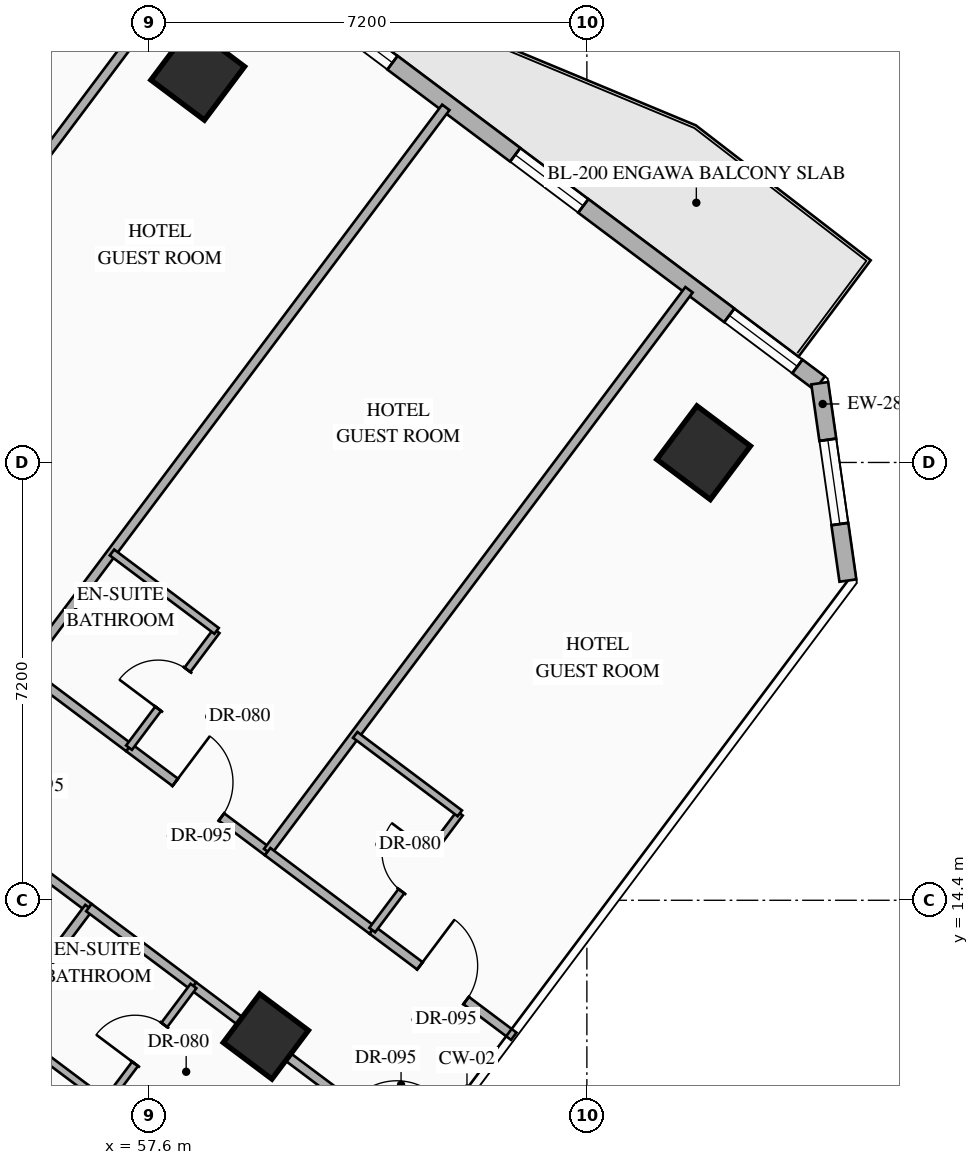
"""IFC4 building model, lengths in metres.
Left out: names, types, materials, properties, quantities, classifications, styles, units other than length and angle.
Written with IfcOpenShell. Run it as: python <this file> out.ifc"""

import sys

from ifc_helpers import new_model, si_unit, direction, frame, frame_2d, origin, origin_2d, place, context, subcontext, project, spatial, rectangle, hollow_rectangle, extrude, element, fill, save


model = new_model("IFC4")
c1 = context("Model", 3, precision=1e-05, world=origin(), true_north=direction((0.0, 1.0)))
c2 = subcontext(c1, "Body", "Model", "MODEL_VIEW")
j1 = project(units=[si_unit("LENGTHUNIT", "METRE"), si_unit("PLANEANGLEUNIT", "RADIAN")], contexts=[c1])
p1 = place(None, origin())
s1 = spatial("IfcSite", under=j1, at=p1, CompositionType="ELEMENT")
p2 = place(p1, origin())
s2 = spatial("IfcBuilding", under=s1, at=p2, CompositionType="ELEMENT")
p3 = place(p2, frame((0.0, 0.0, 63.4)))
s3 = spatial("IfcBuildingStorey", under=s2, at=p3, CompositionType="ELEMENT", Elevation=63.4)
for number, where, z_axis, x_axis in (
    (1, (58.4, 28.0, 0.0), (0.0, 0.0, 1.0), (0.8, -0.6, 0.0)),
    (2, (66.72, 21.76, 0.0), (0.0, 0.0, 1.0), (0.8, -0.6, 0.0)),
):
    element("IfcColumn", number, at=place(p3, frame(where, z_axis=z_axis, x_axis=x_axis)), inside=s3, PredefinedType="COLUMN", context=c2, shape_type="SweptSolid", body=[
        extrude(hollow_rectangle(XDim=1.1, YDim=1.1, WallThickness=0.04, at=origin_2d()), origin(), (0.0, 0.0, 1.0), 3.35),
    ])
p4 = place(p3, frame((59.52, 12.16, 0.0), z_axis=(0.0, 0.0, 1.0), x_axis=(0.799999996291, -0.600000004945, 0.0)))
e3 = element("IfcColumn", 3, at=p4, inside=s3, PredefinedType="COLUMN", context=c2, shape_type="SweptSolid", body=[
    extrude(hollow_rectangle(XDim=1.0, YDim=1.0, WallThickness=0.038, at=origin_2d()), origin(), (0.0, 0.0, 1.0), 3.35),
])
p5 = place(p3, frame((44.86, 40.73, 0.0), z_axis=(0.0, 0.0, 1.0), x_axis=(0.800006902154, -0.599990797017, 0.0)))
e4 = element("IfcWall", 4, at=p5, inside=s3, PredefinedType="STANDARD", context=c2, shape_type="SweptSolid", body=[
    extrude(rectangle(XDim=29.712, YDim=0.28, at=frame_2d((14.856, 0.0))), origin(), (0.0, 0.0, 1.0), 3.13),
])
p6 = place(p5, frame((14.249, 0.0, 0.0)))
e5 = element("IfcOpeningElement", 5, at=p6, cuts=e4, PredefinedType="OPENING", context=c2, shape_type="SweptSolid", body=[
    extrude(rectangle(XDim=1.1, YDim=2.2, at=frame_2d((0.55, 1.1))), frame((0.0, 0.15, 0.0), z_axis=(0.0, -1.0, 0.0), x_axis=(1.0, 0.0, 0.0)), (0.0, 0.0, 1.0), 0.3),
])
p7 = place(p5, frame((1.612, 0.0, 0.85)))
e6 = element("IfcOpeningElement", 6, at=p7, cuts=e4, PredefinedType="OPENING", context=c2, shape_type="SweptSolid", body=[
    extrude(rectangle(XDim=1.4, YDim=1.8, at=frame_2d((0.7, 0.9))), frame((0.0, 0.15, 0.0), z_axis=(0.0, -1.0, 0.0), x_axis=(1.0, 0.0, 0.0)), (0.0, 0.0, 1.0), 0.3),
])
p8 = place(p5, frame((5.667, 0.0, 0.85)))
e7 = element("IfcOpeningElement", 7, at=p8, cuts=e4, PredefinedType="OPENING", context=c2, shape_type="SweptSolid", body=[
    extrude(rectangle(XDim=1.4, YDim=1.8, at=frame_2d((0.7, 0.9))), frame((0.0, 0.15, 0.0), z_axis=(0.0, -1.0, 0.0), x_axis=(1.0, 0.0, 0.0)), (0.0, 0.0, 1.0), 0.3),
])
p9 = place(p5, frame((9.912, 0.0, 0.85)))
e8 = element("IfcOpeningElement", 8, at=p9, cuts=e4, PredefinedType="OPENING", context=c2, shape_type="SweptSolid", body=[
    extrude(rectangle(XDim=1.4, YDim=1.8, at=frame_2d((0.7, 0.9))), frame((0.0, 0.15, 0.0), z_axis=(0.0, -1.0, 0.0), x_axis=(1.0, 0.0, 0.0)), (0.0, 0.0, 1.0), 0.3),
])
p10 = place(p5, frame((19.528, 0.0, 0.85)))
e9 = element("IfcOpeningElement", 9, at=p10, cuts=e4, PredefinedType="OPENING", context=c2, shape_type="SweptSolid", body=[
    extrude(rectangle(XDim=1.4, YDim=1.8, at=frame_2d((0.7, 0.9))), frame((0.0, 0.15, 0.0), z_axis=(0.0, -1.0, 0.0), x_axis=(1.0, 0.0, 0.0)), (0.0, 0.0, 1.0), 0.3),
])
p11 = place(p5, frame((23.451, 0.0, 0.85)))
e10 = element("IfcOpeningElement", 10, at=p11, cuts=e4, PredefinedType="OPENING", context=c2, shape_type="SweptSolid", body=[
    extrude(rectangle(XDim=1.4, YDim=1.8, at=frame_2d((0.7, 0.9))), frame((0.0, 0.15, 0.0), z_axis=(0.0, -1.0, 0.0), x_axis=(1.0, 0.0, 0.0)), (0.0, 0.0, 1.0), 0.3),
])
p12 = place(p5, frame((27.852, 0.0, 0.85)))
e11 = element("IfcOpeningElement", 11, at=p12, cuts=e4, PredefinedType="OPENING", context=c2, shape_type="SweptSolid", body=[
    extrude(rectangle(XDim=1.4, YDim=1.8, at=frame_2d((0.7, 0.9))), frame((0.0, 0.15, 0.0), z_axis=(0.0, -1.0, 0.0), x_axis=(1.0, 0.0, 0.0)), (0.0, 0.0, 1.0), 0.3),
])
p13 = place(p3, frame((68.63, 22.903, 0.0), z_axis=(0.0, 0.0, 1.0), x_axis=(0.141285803956, -0.989968848803, 0.0)))
e12 = element("IfcWall", 12, at=p13, inside=s3, PredefinedType="STANDARD", context=c2, shape_type="SweptSolid", body=[
    extrude(rectangle(XDim=3.278, YDim=0.28, at=frame_2d((1.639, 0.0))), origin(), (0.0, 0.0, 1.0), 3.13),
])
p14 = place(p13, frame((0.939, 0.0, 0.85)))
e13 = element("IfcOpeningElement", 13, at=p14, cuts=e12, PredefinedType="OPENING", context=c2, shape_type="SweptSolid", body=[
    extrude(rectangle(XDim=1.4, YDim=1.8, at=frame_2d((0.7, 0.9))), frame((0.0, 0.15, 0.0), z_axis=(0.0, -1.0, 0.0), x_axis=(1.0, 0.0, 0.0)), (0.0, 0.0, 1.0), 0.3),
])
for number, where, z_axis, x_axis in (
    (14, (51.71, 21.08, 0.0), (0.0, 0.0, 1.0), (0.6, 0.8, 0.0)),
    (15, (55.55, 18.2, 0.0), (0.0, 0.0, 1.0), (0.6, 0.8, 0.0)),
):
    element("IfcWall", number, at=place(p3, frame(where, z_axis=z_axis, x_axis=x_axis)), inside=s3, PredefinedType="PARTITIONING", context=c2, shape_type="SweptSolid", body=[
        extrude(rectangle(XDim=11.55, YDim=0.15, at=frame_2d((5.775, 0.0))), origin(), (0.0, 0.0, 1.0), 3.13),
    ])
p15 = place(p3, frame((55.55, 18.2, 0.0), z_axis=(0.0, 0.0, 1.0), x_axis=(0.79998637334, -0.60001816845, 0.0)))
e16 = element("IfcWall", 16, at=p15, inside=s3, PredefinedType="PARTITIONING", context=c2, shape_type="SweptSolid", body=[
    extrude(rectangle(XDim=2.15, YDim=0.15, at=frame_2d((1.075, 0.0))), origin(), (0.0, 0.0, 1.0), 2.775),
])
p16 = place(p3, frame((57.27, 16.91, 0.0), z_axis=(0.0, 0.0, 1.0), x_axis=(0.800010279488, -0.599986293772, 0.0)))
e17 = element("IfcWall", 17, at=p16, inside=s3, PredefinedType="PARTITIONING", context=c2, shape_type="SweptSolid", body=[
    extrude(rectangle(XDim=2.85, YDim=0.15, at=frame_2d((1.425, 0.0))), origin(), (0.0, 0.0, 1.0), 2.775),
])
p17 = place(p16, frame((0.95, 0.0, 0.0)))
e18 = element("IfcOpeningElement", 18, at=p17, cuts=e17, PredefinedType="OPENING", context=c2, shape_type="SweptSolid", body=[
    extrude(rectangle(XDim=0.95, YDim=2.15, at=frame_2d((0.475, 1.075))), frame((0.0, 0.085, 0.0), z_axis=(0.0, -1.0, 0.0), x_axis=(1.0, 0.0, 0.0)), (0.0, 0.0, 1.0), 0.17),
])
p18 = place(p3, frame((57.27, 16.91, 0.0), z_axis=(0.0, 0.0, 1.0), x_axis=(0.599951172744, 0.800036618114, 0.0)))
e19 = element("IfcWall", 19, at=p18, inside=s3, PredefinedType="PARTITIONING", context=c2, shape_type="SweptSolid", body=[
    extrude(rectangle(XDim=2.4, YDim=0.12, at=frame_2d((1.2, 0.0))), origin(), (0.0, 0.0, 1.0), 3.13),
])
p19 = place(p18, frame((0.8, 0.0, 0.0)))
e20 = element("IfcOpeningElement", 20, at=p19, cuts=e19, PredefinedType="OPENING", context=c2, shape_type="SweptSolid", body=[
    extrude(rectangle(XDim=0.8, YDim=2.06, at=frame_2d((0.4, 1.03))), frame((0.0, 0.07, 0.0), z_axis=(0.0, -1.0, 0.0), x_axis=(1.0, 0.0, 0.0)), (0.0, 0.0, 1.0), 0.14),
])
p20 = place(p3, frame((56.99, 20.12, 0.0), z_axis=(0.0, 0.0, 1.0), x_axis=(0.79998637334, -0.60001816845, 0.0)))
e21 = element("IfcWall", 21, at=p20, inside=s3, PredefinedType="PARTITIONING", context=c2, shape_type="SweptSolid", body=[
    extrude(rectangle(XDim=2.15, YDim=0.12, at=frame_2d((1.075, 0.0))), origin(), (0.0, 0.0, 1.0), 3.13),
])
p21 = place(p3, frame((59.55, 15.2, 0.0), z_axis=(0.0, 0.0, 1.0), x_axis=(0.599996617946, 0.80000253653, 0.0)))
e22 = element("IfcWall", 22, at=p21, inside=s3, PredefinedType="PARTITIONING", context=c2, shape_type="SweptSolid", body=[
    extrude(rectangle(XDim=11.55, YDim=0.15, at=frame_2d((5.775, 0.0))), origin(), (0.0, 0.0, 1.0), 3.13),
])
p22 = place(p3, frame((59.55, 15.2, 0.0), z_axis=(0.0, 0.0, 1.0), x_axis=(0.79998637334, -0.60001816845, 0.0)))
e23 = element("IfcWall", 23, at=p22, inside=s3, PredefinedType="PARTITIONING", context=c2, shape_type="SweptSolid", body=[
    extrude(rectangle(XDim=2.15, YDim=0.15, at=frame_2d((1.075, 0.0))), origin(), (0.0, 0.0, 1.0), 2.775),
])
p23 = place(p3, frame((61.27, 13.91, 0.0), z_axis=(0.0, 0.0, 1.0), x_axis=(0.800010068184, -0.59998657552, 0.0)))
e24 = element("IfcWall", 24, at=p23, inside=s3, PredefinedType="PARTITIONING", context=c2, shape_type="SweptSolid", body=[
    extrude(rectangle(XDim=2.91, YDim=0.15, at=frame_2d((1.455, 0.0))), origin(), (0.0, 0.0, 1.0), 3.13),
])
p24 = place(p23, frame((0.98, 0.0, 0.0)))
e25 = element("IfcOpeningElement", 25, at=p24, cuts=e24, PredefinedType="OPENING", context=c2, shape_type="SweptSolid", body=[
    extrude(rectangle(XDim=0.95, YDim=2.15, at=frame_2d((0.475, 1.075))), frame((0.0, 0.085, 0.0), z_axis=(0.0, -1.0, 0.0), x_axis=(1.0, 0.0, 0.0)), (0.0, 0.0, 1.0), 0.17),
])
p25 = place(p3, frame((61.27, 13.91, 0.0), z_axis=(0.0, 0.0, 1.0), x_axis=(0.599951172744, 0.800036618114, 0.0)))
e26 = element("IfcWall", 26, at=p25, inside=s3, PredefinedType="PARTITIONING", context=c2, shape_type="SweptSolid", body=[
    extrude(rectangle(XDim=2.4, YDim=0.12, at=frame_2d((1.2, 0.0))), origin(), (0.0, 0.0, 1.0), 3.13),
])
p26 = place(p25, frame((0.8, 0.0, 0.0)))
e27 = element("IfcOpeningElement", 27, at=p26, cuts=e26, PredefinedType="OPENING", context=c2, shape_type="SweptSolid", body=[
    extrude(rectangle(XDim=0.8, YDim=2.06, at=frame_2d((0.4, 1.03))), frame((0.0, 0.07, 0.0), z_axis=(0.0, -1.0, 0.0), x_axis=(1.0, 0.0, 0.0)), (0.0, 0.0, 1.0), 0.14),
])
p27 = place(p3, frame((60.99, 17.12, 0.0), z_axis=(0.0, 0.0, 1.0), x_axis=(0.79998637334, -0.60001816845, 0.0)))
e28 = element("IfcWall", 28, at=p27, inside=s3, PredefinedType="PARTITIONING", context=c2, shape_type="SweptSolid", body=[
    extrude(rectangle(XDim=2.15, YDim=0.12, at=frame_2d((1.075, 0.0))), origin(), (0.0, 0.0, 1.0), 3.13),
])
p28 = place(p3, frame((52.89, 17.07, 0.0), z_axis=(0.0, 0.0, 1.0), x_axis=(0.800012600101, -0.599983199498, 0.0)))
e29 = element("IfcWall", 29, at=p28, inside=s3, PredefinedType="PARTITIONING", context=c2, shape_type="SweptSolid", body=[
    extrude(rectangle(XDim=4.65, YDim=0.15, at=frame_2d((2.325, 0.0))), origin(), (0.0, 0.0, 1.0), 2.425),
])
p29 = place(p28, frame((1.85, 0.0, 0.0)))
e30 = element("IfcOpeningElement", 30, at=p29, cuts=e29, PredefinedType="OPENING", context=c2, shape_type="SweptSolid", body=[
    extrude(rectangle(XDim=0.95, YDim=2.15, at=frame_2d((0.475, 1.075))), frame((0.0, 0.085, 0.0), z_axis=(0.0, -1.0, 0.0), x_axis=(1.0, 0.0, 0.0)), (0.0, 0.0, 1.0), 0.17),
])
p30 = place(p3, frame((49.8, 5.2, 0.0), z_axis=(0.0, 0.0, 1.0), x_axis=(0.6, 0.8, 0.0)))
e31 = element("IfcWall", 31, at=p30, inside=s3, PredefinedType="PARTITIONING", context=c2, shape_type="SweptSolid", body=[
    extrude(rectangle(XDim=11.35, YDim=0.15, at=frame_2d((5.675, 0.0))), origin(), (0.0, 0.0, 1.0), 3.13),
])
p31 = place(p3, frame((56.61, 14.28, 0.0), z_axis=(0.0, 0.0, 1.0), x_axis=(0.79998637334, -0.60001816845, 0.0)))
e32 = element("IfcWall", 32, at=p31, inside=s3, PredefinedType="PARTITIONING", context=c2, shape_type="SweptSolid", body=[
    extrude(rectangle(XDim=2.15, YDim=0.15, at=frame_2d((1.075, 0.0))), origin(), (0.0, 0.0, 1.0), 2.425),
])
p32 = place(p3, frame((58.33, 12.99, 0.0), z_axis=(0.0, 0.0, 1.0), x_axis=(0.799993779569, -0.600008293819, 0.0)))
e33 = element("IfcWall", 33, at=p32, inside=s3, PredefinedType="PARTITIONING", context=c2, shape_type="SweptSolid", body=[
    extrude(rectangle(XDim=4.71, YDim=0.15, at=frame_2d((2.355, 0.0))), origin(), (0.0, 0.0, 1.0), 2.425),
])
p33 = place(p32, frame((3.23, 0.0, 0.0)))
e34 = element("IfcOpeningElement", 34, at=p33, cuts=e33, PredefinedType="OPENING", context=c2, shape_type="SweptSolid", body=[
    extrude(rectangle(XDim=0.95, YDim=2.15, at=frame_2d((0.475, 1.075))), frame((0.0, 0.085, 0.0), z_axis=(0.0, -1.0, 0.0), x_axis=(1.0, 0.0, 0.0)), (0.0, 0.0, 1.0), 0.17),
])
p34 = place(p3, frame((56.89, 11.07, 0.0), z_axis=(0.0, 0.0, 1.0), x_axis=(0.600065100855, 0.79995117022, 0.0)))
e35 = element("IfcWall", 35, at=p34, inside=s3, PredefinedType="PARTITIONING", context=c2, shape_type="SweptSolid", body=[
    extrude(rectangle(XDim=2.4, YDim=0.12, at=frame_2d((1.2, 0.0))), origin(), (0.0, 0.0, 1.0), 3.13),
])
p35 = place(p34, frame((0.8, 0.0, 0.0)))
e36 = element("IfcOpeningElement", 36, at=p35, cuts=e35, PredefinedType="OPENING", context=c2, shape_type="SweptSolid", body=[
    extrude(rectangle(XDim=0.8, YDim=2.06, at=frame_2d((0.4, 1.03))), frame((0.0, 0.07, 0.0), z_axis=(0.0, -1.0, 0.0), x_axis=(1.0, 0.0, 0.0)), (0.0, 0.0, 1.0), 0.14),
])
p36 = place(p3, frame((55.17, 12.36, 0.0), z_axis=(0.0, 0.0, 1.0), x_axis=(0.79998637334, -0.60001816845, 0.0)))
e37 = element("IfcWall", 37, at=p36, inside=s3, PredefinedType="PARTITIONING", context=c2, shape_type="SweptSolid", body=[
    extrude(rectangle(XDim=2.15, YDim=0.12, at=frame_2d((1.075, 0.0))), origin(), (0.0, 0.0, 1.0), 3.13),
])
p37 = place(p10, origin())
e38 = element("IfcWindow", 38, at=p37, inside=s3, PartitioningType="SINGLE_PANEL", PredefinedType="WINDOW", context=c2, shape_type="SweptSolid", body=[
    extrude(rectangle(XDim=1.4, YDim=1.8, at=frame_2d((0.7, 0.9))), frame((0.0, 0.03, 0.0), z_axis=(0.0, -1.0, 0.0), x_axis=(1.0, 0.0, 0.0)), (0.0, 0.0, 1.0), 0.06),
])
fill(e9, e38)
p38 = place(p11, origin())
e39 = element("IfcWindow", 39, at=p38, inside=s3, PartitioningType="SINGLE_PANEL", PredefinedType="WINDOW", context=c2, shape_type="SweptSolid", body=[
    extrude(rectangle(XDim=1.4, YDim=1.8, at=frame_2d((0.7, 0.9))), frame((0.0, 0.03, 0.0), z_axis=(0.0, -1.0, 0.0), x_axis=(1.0, 0.0, 0.0)), (0.0, 0.0, 1.0), 0.06),
])
fill(e10, e39)
p39 = place(p12, origin())
e40 = element("IfcWindow", 40, at=p39, inside=s3, PartitioningType="SINGLE_PANEL", PredefinedType="WINDOW", context=c2, shape_type="SweptSolid", body=[
    extrude(rectangle(XDim=1.4, YDim=1.8, at=frame_2d((0.7, 0.9))), frame((0.0, 0.03, 0.0), z_axis=(0.0, -1.0, 0.0), x_axis=(1.0, 0.0, 0.0)), (0.0, 0.0, 1.0), 0.06),
])
fill(e11, e40)
p40 = place(p14, origin())
e41 = element("IfcWindow", 41, at=p40, inside=s3, PartitioningType="SINGLE_PANEL", PredefinedType="WINDOW", context=c2, shape_type="SweptSolid", body=[
    extrude(rectangle(XDim=1.4, YDim=1.8, at=frame_2d((0.7, 0.9))), frame((0.0, 0.03, 0.0), z_axis=(0.0, -1.0, 0.0), x_axis=(1.0, 0.0, 0.0)), (0.0, 0.0, 1.0), 0.06),
])
fill(e13, e41)
p41 = place(p17, origin())
e42 = element("IfcDoor", 42, at=p41, inside=s3, OperationType="SINGLE_SWING_LEFT", PredefinedType="DOOR", context=c2, shape_type="SweptSolid", body=[
    extrude(rectangle(XDim=0.95, YDim=2.15, at=frame_2d((0.475, 1.075))), frame((0.0, 0.025, 0.0), z_axis=(0.0, -1.0, 0.0), x_axis=(1.0, 0.0, 0.0)), (0.0, 0.0, 1.0), 0.05),
])
fill(e18, e42)
p42 = place(p19, origin())
e43 = element("IfcDoor", 43, at=p42, inside=s3, OperationType="SINGLE_SWING_LEFT", PredefinedType="DOOR", context=c2, shape_type="SweptSolid", body=[
    extrude(rectangle(XDim=0.8, YDim=2.06, at=frame_2d((0.4, 1.03))), frame((0.0, 0.025, 0.0), z_axis=(0.0, -1.0, 0.0), x_axis=(1.0, 0.0, 0.0)), (0.0, 0.0, 1.0), 0.05),
])
fill(e20, e43)
p43 = place(p24, origin())
e44 = element("IfcDoor", 44, at=p43, inside=s3, OperationType="SINGLE_SWING_LEFT", PredefinedType="DOOR", context=c2, shape_type="SweptSolid", body=[
    extrude(rectangle(XDim=0.95, YDim=2.15, at=frame_2d((0.475, 1.075))), frame((0.0, 0.025, 0.0), z_axis=(0.0, -1.0, 0.0), x_axis=(1.0, 0.0, 0.0)), (0.0, 0.0, 1.0), 0.05),
])
fill(e25, e44)
p44 = place(p26, origin())
e45 = element("IfcDoor", 45, at=p44, inside=s3, OperationType="SINGLE_SWING_RIGHT", PredefinedType="DOOR", context=c2, shape_type="SweptSolid", body=[
    extrude(rectangle(XDim=0.8, YDim=2.06, at=frame_2d((0.4, 1.03))), frame((0.0, 0.025, 0.0), z_axis=(0.0, -1.0, 0.0), x_axis=(1.0, 0.0, 0.0)), (0.0, 0.0, 1.0), 0.05),
])
fill(e27, e45)
p45 = place(p35, origin())
e46 = element("IfcDoor", 46, at=p45, inside=s3, OperationType="SINGLE_SWING_LEFT", PredefinedType="DOOR", context=c2, shape_type="SweptSolid", body=[
    extrude(rectangle(XDim=0.8, YDim=2.06, at=frame_2d((0.4, 1.03))), frame((0.0, 0.025, 0.0), z_axis=(0.0, -1.0, 0.0), x_axis=(1.0, 0.0, 0.0)), (0.0, 0.0, 1.0), 0.05),
])
fill(e36, e46)
save(model, sys.argv[1])
